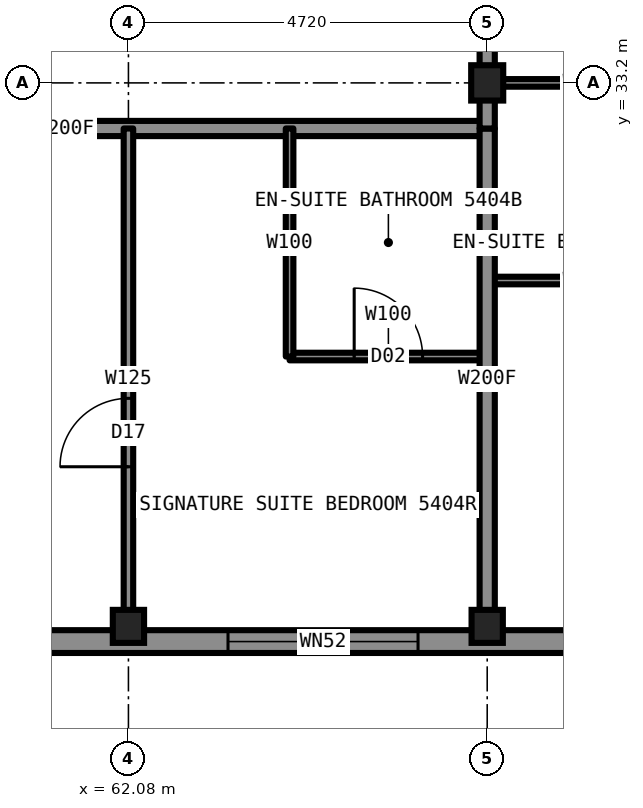
"""IFC4 building model, lengths in metres.
Left out: names, types, materials, properties, quantities, classifications, styles, units other than length and angle.
Written with IfcOpenShell. Run it as: python <this file> out.ifc"""

import sys

from ifc_helpers import new_model, si_unit, direction, frame, frame_2d, origin, origin_2d, place, context, subcontext, project, spatial, rectangle, i_section, extrude, element, fill, save


model = new_model("IFC4")
c1 = context("Model", 3, precision=1e-05, world=origin(), true_north=direction((0.0, 1.0)))
c2 = subcontext(c1, "Body", "Model", "MODEL_VIEW")
j1 = project(units=[si_unit("LENGTHUNIT", "METRE"), si_unit("PLANEANGLEUNIT", "RADIAN")], contexts=[c1])
p1 = place(None, origin())
s1 = spatial("IfcSite", under=j1, at=p1, CompositionType="ELEMENT")
p2 = place(p1, origin())
s2 = spatial("IfcBuilding", under=s1, at=p2, CompositionType="ELEMENT")
p3 = place(p2, frame((0.0, 0.0, 193.3)))
s3 = spatial("IfcBuildingStorey", under=s2, at=p3, CompositionType="ELEMENT", Elevation=193.3)
for number, where, z_axis, x_axis in (
    (1, (62.08, 26.05, 0.0), (0.0, 0.0, 1.0), (1.0, 0.0, 0.0)),
    (2, (66.8, 26.05, 0.0), (0.0, 0.0, 1.0), (1.0, 0.0, 0.0)),
):
    element("IfcColumn", number, at=place(p3, frame(where, z_axis=z_axis, x_axis=x_axis)), inside=s3, PredefinedType="COLUMN", context=c2, shape_type="SweptSolid", body=[
        extrude(i_section(OverallWidth=0.411, OverallDepth=0.434, WebThickness=0.036, FlangeThickness=0.057, at=origin_2d()), origin(), (0.0, 0.0, 1.0), 3.5),
    ])
p4 = place(p3, frame((66.8, 33.2, 0.0), z_axis=(0.0, 0.0, 1.0), x_axis=(1.0, 0.0, 0.0)))
e3 = element("IfcColumn", 3, at=p4, inside=s3, PredefinedType="COLUMN", context=c2, shape_type="SweptSolid", body=[
    extrude(i_section(OverallWidth=0.422, OverallDepth=0.465, WebThickness=0.045, FlangeThickness=0.073, at=origin_2d()), origin(), (0.0, 0.0, 1.0), 3.5),
])
p5 = place(p3, frame((66.8, 33.2, 0.0), z_axis=(0.0, 0.0, 1.0), x_axis=(1.0, 0.0, 0.0)))
e4 = element("IfcWall", 4, at=p5, inside=s3, PredefinedType="PARTITIONING", context=c2, shape_type="SweptSolid", body=[
    extrude(rectangle(XDim=2.6, YDim=0.1, at=frame_2d((1.3, 0.0))), origin(), (0.0, 0.0, 1.0), 2.573),
])
p6 = place(p3, frame((43.2, 32.6, 0.0), z_axis=(0.0, 0.0, 1.0), x_axis=(1.0, 0.0, 0.0)))
e5 = element("IfcWall", 5, at=p6, inside=s3, PredefinedType="PARTITIONING", context=c2, shape_type="SweptSolid", body=[
    extrude(rectangle(XDim=23.6, YDim=0.2, at=frame_2d((11.8, 0.0))), origin(), (0.0, 0.0, 1.0), 3.33),
])
p7 = place(p6, frame((3.0, 0.0, 0.0)))
e6 = element("IfcOpeningElement", 6, at=p7, cuts=e5, PredefinedType="OPENING", context=c2, shape_type="SweptSolid", body=[
    extrude(rectangle(XDim=1.0, YDim=2.2, at=frame_2d((0.5, 1.1))), frame((0.0, 0.11, 0.0), z_axis=(0.0, -1.0, 0.0), x_axis=(1.0, 0.0, 0.0)), (0.0, 0.0, 1.0), 0.22),
])
p8 = place(p6, frame((11.29, 0.0, 0.0)))
e7 = element("IfcOpeningElement", 7, at=p8, cuts=e5, PredefinedType="OPENING", context=c2, shape_type="SweptSolid", body=[
    extrude(rectangle(XDim=1.1, YDim=2.2, at=frame_2d((0.55, 1.1))), frame((0.0, 0.11, 0.0), z_axis=(0.0, -1.0, 0.0), x_axis=(1.0, 0.0, 0.0)), (0.0, 0.0, 1.0), 0.22),
])
p9 = place(p3, frame((66.8, 30.6, 0.0), z_axis=(0.0, 0.0, 1.0), x_axis=(1.0, 0.0, 0.0)))
e8 = element("IfcWall", 8, at=p9, inside=s3, PredefinedType="PARTITIONING", context=c2, shape_type="SweptSolid", body=[
    extrude(rectangle(XDim=2.6, YDim=0.1, at=frame_2d((1.3, 0.0))), origin(), (0.0, 0.0, 1.0), 3.33),
])
p10 = place(p3, frame((64.2, 29.6, 0.0), z_axis=(0.0, 0.0, 1.0), x_axis=(1.0, 0.0, 0.0)))
e9 = element("IfcWall", 9, at=p10, inside=s3, PredefinedType="PARTITIONING", context=c2, shape_type="SweptSolid", body=[
    extrude(rectangle(XDim=2.6, YDim=0.1, at=frame_2d((1.3, 0.0))), origin(), (0.0, 0.0, 1.0), 3.33),
])
p11 = place(p10, frame((0.85, 0.0, 0.0)))
e10 = element("IfcOpeningElement", 10, at=p11, cuts=e9, PredefinedType="OPENING", context=c2, shape_type="SweptSolid", body=[
    extrude(rectangle(XDim=0.9, YDim=2.1, at=frame_2d((0.45, 1.05))), frame((0.0, 0.06, 0.0), z_axis=(0.0, -1.0, 0.0), x_axis=(1.0, 0.0, 0.0)), (0.0, 0.0, 1.0), 0.12),
])
p12 = place(p3, frame((66.8, 33.22, 0.0), z_axis=(0.0, 0.0, 1.0), x_axis=(0.0, 1.0, 0.0)))
e11 = element("IfcWall", 11, at=p12, inside=s3, PredefinedType="PARTITIONING", context=c2, shape_type="SweptSolid", body=[
    extrude(rectangle(XDim=23.56, YDim=0.2, at=frame_2d((11.78, 0.0))), origin(), (0.0, 0.0, 1.0), 3.33),
])
p13 = place(p12, frame((7.85, 0.0, 0.0)))
e12 = element("IfcOpeningElement", 12, at=p13, cuts=e11, PredefinedType="OPENING", context=c2, shape_type="SweptSolid", body=[
    extrude(rectangle(XDim=1.0, YDim=2.2, at=frame_2d((0.5, 1.1))), frame((0.0, 0.11, 0.0), z_axis=(0.0, -1.0, 0.0), x_axis=(1.0, 0.0, 0.0)), (0.0, 0.0, 1.0), 0.22),
])
p14 = place(p12, frame((12.42, 0.0, 0.0)))
e13 = element("IfcOpeningElement", 13, at=p14, cuts=e11, PredefinedType="OPENING", context=c2, shape_type="SweptSolid", body=[
    extrude(rectangle(XDim=1.0, YDim=2.2, at=frame_2d((0.5, 1.1))), frame((0.0, 0.11, 0.0), z_axis=(0.0, -1.0, 0.0), x_axis=(1.0, 0.0, 0.0)), (0.0, 0.0, 1.0), 0.22),
])
p15 = place(p12, frame((22.03, 0.0, 0.0)))
e14 = element("IfcOpeningElement", 14, at=p15, cuts=e11, PredefinedType="OPENING", context=c2, shape_type="SweptSolid", body=[
    extrude(rectangle(XDim=1.1, YDim=2.2, at=frame_2d((0.55, 1.1))), frame((0.0, 0.11, 0.0), z_axis=(0.0, -1.0, 0.0), x_axis=(1.0, 0.0, 0.0)), (0.0, 0.0, 1.0), 0.22),
])
p16 = place(p12, frame((0.63, 0.0, 0.0)))
e15 = element("IfcOpeningElement", 15, at=p16, cuts=e11, PredefinedType="OPENING", context=c2, shape_type="SweptSolid", body=[
    extrude(rectangle(XDim=1.1, YDim=2.2, at=frame_2d((0.55, 1.1))), frame((0.0, 0.11, 0.0), z_axis=(0.0, -1.0, 0.0), x_axis=(1.0, 0.0, 0.0)), (0.0, 0.0, 1.0), 0.22),
])
p17 = place(p3, frame((66.8, 26.0, 0.0), z_axis=(0.0, 0.0, 1.0), x_axis=(0.0, 1.0, 0.0)))
e16 = element("IfcWall", 16, at=p17, inside=s3, PredefinedType="PARTITIONING", context=c2, shape_type="SweptSolid", body=[
    extrude(rectangle(XDim=6.6, YDim=0.2, at=frame_2d((3.3, 0.0))), origin(), (0.0, 0.0, 1.0), 2.573),
])
p18 = place(p3, frame((62.08, 26.0, 0.0), z_axis=(0.0, 0.0, 1.0), x_axis=(0.0, 1.0, 0.0)))
e17 = element("IfcWall", 17, at=p18, inside=s3, PredefinedType="PARTITIONING", context=c2, shape_type="SweptSolid", body=[
    extrude(rectangle(XDim=6.6, YDim=0.125, at=frame_2d((3.3, 0.0))), origin(), (0.0, 0.0, 1.0), 2.573),
])
p19 = place(p18, frame((2.15, 0.0, 0.0)))
e18 = element("IfcOpeningElement", 18, at=p19, cuts=e17, PredefinedType="OPENING", context=c2, shape_type="SweptSolid", body=[
    extrude(rectangle(XDim=0.9, YDim=2.2, at=frame_2d((0.45, 1.1))), frame((0.0, 0.073, 0.0), z_axis=(0.0, -1.0, 0.0), x_axis=(1.0, 0.0, 0.0)), (0.0, 0.0, 1.0), 0.145),
])
p20 = place(p3, frame((64.2, 29.6, 0.0), z_axis=(0.0, 0.0, 1.0), x_axis=(0.0, 1.0, 0.0)))
e19 = element("IfcWall", 19, at=p20, inside=s3, PredefinedType="PARTITIONING", context=c2, shape_type="SweptSolid", body=[
    extrude(rectangle(XDim=3.0, YDim=0.1, at=frame_2d((1.5, 0.0))), origin(), (0.0, 0.0, 1.0), 3.33),
])
p21 = place(p3, frame((41.2, 25.85, 0.0), z_axis=(0.0, 0.0, 1.0), x_axis=(1.0, 0.0, 0.0)))
e20 = element("IfcWall", 20, at=p21, inside=s3, PredefinedType="SOLIDWALL", context=c2, shape_type="SweptSolid", body=[
    extrude(rectangle(XDim=27.6, YDim=0.3, at=frame_2d((13.8, 0.0))), origin(), (0.0, 0.0, 1.0), 2.83),
])
p22 = place(p21, frame((2.86, 0.0, 0.3)))
e21 = element("IfcOpeningElement", 21, at=p22, cuts=e20, PredefinedType="OPENING", context=c2, shape_type="SweptSolid", body=[
    extrude(rectangle(XDim=3.0, YDim=2.0, at=frame_2d((1.5, 1.0))), frame((0.0, 0.16, 0.0), z_axis=(0.0, -1.0, 0.0), x_axis=(1.0, 0.0, 0.0)), (0.0, 0.0, 1.0), 0.32),
])
p23 = place(p21, frame((7.58, 0.0, 0.3)))
e22 = element("IfcOpeningElement", 22, at=p23, cuts=e20, PredefinedType="OPENING", context=c2, shape_type="SweptSolid", body=[
    extrude(rectangle(XDim=2.5, YDim=2.0, at=frame_2d((1.25, 1.0))), frame((0.0, 0.16, 0.0), z_axis=(0.0, -1.0, 0.0), x_axis=(1.0, 0.0, 0.0)), (0.0, 0.0, 1.0), 0.32),
])
p24 = place(p21, frame((12.95, 0.0, 1.0)))
e23 = element("IfcOpeningElement", 23, at=p24, cuts=e20, PredefinedType="OPENING", context=c2, shape_type="SweptSolid", body=[
    extrude(rectangle(XDim=1.7, YDim=1.3, at=frame_2d((0.85, 0.65))), frame((0.0, 0.16, 0.0), z_axis=(0.0, -1.0, 0.0), x_axis=(1.0, 0.0, 0.0)), (0.0, 0.0, 1.0), 0.32),
])
p25 = place(p21, frame((17.52, 0.0, 0.3)))
e24 = element("IfcOpeningElement", 24, at=p25, cuts=e20, PredefinedType="OPENING", context=c2, shape_type="SweptSolid", body=[
    extrude(rectangle(XDim=2.5, YDim=2.0, at=frame_2d((1.25, 1.0))), frame((0.0, 0.16, 0.0), z_axis=(0.0, -1.0, 0.0), x_axis=(1.0, 0.0, 0.0)), (0.0, 0.0, 1.0), 0.32),
])
p26 = place(p21, frame((21.74, 0.0, 0.3)))
e25 = element("IfcOpeningElement", 25, at=p26, cuts=e20, PredefinedType="OPENING", context=c2, shape_type="SweptSolid", body=[
    extrude(rectangle(XDim=3.0, YDim=2.0, at=frame_2d((1.5, 1.0))), frame((0.0, 0.16, 0.0), z_axis=(0.0, -1.0, 0.0), x_axis=(1.0, 0.0, 0.0)), (0.0, 0.0, 1.0), 0.32),
])
p27 = place(p3, frame((66.8, 32.6, 0.0), z_axis=(0.0, 0.0, 1.0), x_axis=(0.0, 1.0, 0.0)))
e26 = element("IfcWall", 26, at=p27, inside=s3, PredefinedType="PARTITIONING", context=c2, shape_type="SweptSolid", body=[
    extrude(rectangle(XDim=0.62, YDim=0.2, at=frame_2d((0.31, 0.0))), origin(), (0.0, 0.0, 1.0), 2.573),
])
p28 = place(p11, origin())
e27 = element("IfcDoor", 27, at=p28, inside=s3, OperationType="SINGLE_SWING_RIGHT", PredefinedType="DOOR", context=c2, shape_type="SweptSolid", body=[
    extrude(rectangle(XDim=0.9, YDim=2.1, at=frame_2d((0.45, 1.05))), frame((0.0, 0.025, 0.0), z_axis=(0.0, -1.0, 0.0), x_axis=(1.0, 0.0, 0.0)), (0.0, 0.0, 1.0), 0.05),
])
fill(e10, e27)
p29 = place(p19, origin())
e28 = element("IfcDoor", 28, at=p29, inside=s3, OperationType="SINGLE_SWING_LEFT", PredefinedType="DOOR", context=c2, shape_type="SweptSolid", body=[
    extrude(rectangle(XDim=0.9, YDim=2.2, at=frame_2d((0.45, 1.1))), frame((0.0, 0.025, 0.0), z_axis=(0.0, -1.0, 0.0), x_axis=(1.0, 0.0, 0.0)), (0.0, 0.0, 1.0), 0.05),
])
fill(e18, e28)
p30 = place(p25, origin())
e29 = element("IfcWindow", 29, at=p30, inside=s3, PartitioningType="SINGLE_PANEL", PredefinedType="WINDOW", context=c2, shape_type="SweptSolid", body=[
    extrude(rectangle(XDim=2.5, YDim=2.0, at=frame_2d((1.25, 1.0))), frame((0.0, 0.13, 0.0), z_axis=(0.0, -1.0, 0.0), x_axis=(1.0, 0.0, 0.0)), (0.0, 0.0, 1.0), 0.06),
])
fill(e24, e29)
p31 = place(p26, origin())
e30 = element("IfcWindow", 30, at=p31, inside=s3, PartitioningType="SINGLE_PANEL", PredefinedType="WINDOW", context=c2, shape_type="SweptSolid", body=[
    extrude(rectangle(XDim=3.0, YDim=2.0, at=frame_2d((1.5, 1.0))), frame((0.0, 0.13, 0.0), z_axis=(0.0, -1.0, 0.0), x_axis=(1.0, 0.0, 0.0)), (0.0, 0.0, 1.0), 0.06),
])
fill(e25, e30)
save(model, sys.argv[1])
